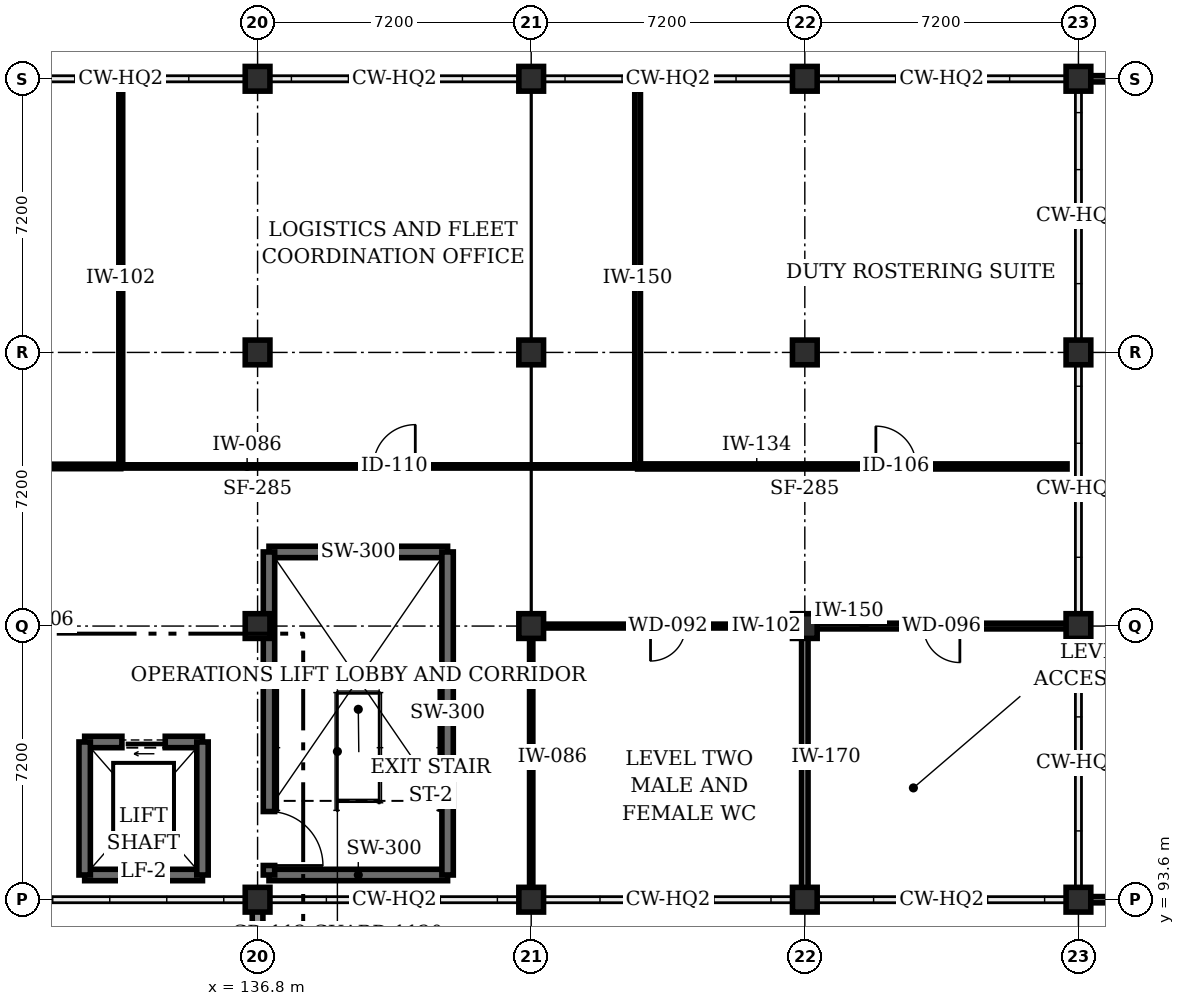
"""IFC4 building model, lengths in metres.
Left out: names, types, materials, properties, quantities, classifications, styles, units other than length and angle.
Written with IfcOpenShell. Run it as: python <this file> out.ifc"""

import sys

from ifc_helpers import new_model, si_unit, direction, frame, frame_2d, origin, origin_2d, place, context, subcontext, project, spatial, rectangle, extrude, element, fill, save


model = new_model("IFC4")
c1 = context("Model", 3, precision=1e-05, world=origin(), true_north=direction((0.0, 1.0)))
c2 = subcontext(c1, "Body", "Model", "MODEL_VIEW")
j1 = project(units=[si_unit("LENGTHUNIT", "METRE"), si_unit("PLANEANGLEUNIT", "RADIAN")], contexts=[c1])
p1 = place(None, origin())
s1 = spatial("IfcSite", under=j1, at=p1, CompositionType="ELEMENT")
p2 = place(p1, origin())
s2 = spatial("IfcBuilding", under=s1, at=p2, CompositionType="ELEMENT")
p3 = place(p2, frame((0.0, 0.0, 6.0)))
s3 = spatial("IfcBuildingStorey", under=s2, at=p3, CompositionType="ELEMENT", Elevation=6.0)
for number, where, z_axis, x_axis in (
    (1, (136.8, 93.6, 0.0), (0.0, 0.0, 1.0), (1.0, 0.0, 0.0)),
    (2, (136.8, 100.8, 0.0), (0.0, 0.0, 1.0), (1.0, 0.0, 0.0)),
    (3, (136.8, 108.0, 0.0), (0.0, 0.0, 1.0), (1.0, 0.0, 0.0)),
    (4, (136.8, 115.2, 0.0), (0.0, 0.0, 1.0), (1.0, 0.0, 0.0)),
    (5, (144.0, 93.6, 0.0), (0.0, 0.0, 1.0), (1.0, 0.0, 0.0)),
    (6, (144.0, 100.8, 0.0), (0.0, 0.0, 1.0), (1.0, 0.0, 0.0)),
    (7, (144.0, 108.0, 0.0), (0.0, 0.0, 1.0), (1.0, 0.0, 0.0)),
    (8, (144.0, 115.2, 0.0), (0.0, 0.0, 1.0), (1.0, 0.0, 0.0)),
    (9, (151.2, 93.6, 0.0), (0.0, 0.0, 1.0), (1.0, 0.0, 0.0)),
    (10, (151.2, 100.8, 0.0), (0.0, 0.0, 1.0), (1.0, 0.0, 0.0)),
    (11, (151.2, 108.0, 0.0), (0.0, 0.0, 1.0), (1.0, 0.0, 0.0)),
    (12, (151.2, 115.2, 0.0), (0.0, 0.0, 1.0), (1.0, 0.0, 0.0)),
    (13, (158.4, 93.6, 0.0), (0.0, 0.0, 1.0), (1.0, 0.0, 0.0)),
    (14, (158.4, 100.8, 0.0), (0.0, 0.0, 1.0), (1.0, 0.0, 0.0)),
    (15, (158.4, 108.0, 0.0), (0.0, 0.0, 1.0), (1.0, 0.0, 0.0)),
    (16, (158.4, 115.2, 0.0), (0.0, 0.0, 1.0), (1.0, 0.0, 0.0)),
):
    element("IfcColumn", number, at=place(p3, frame(where, z_axis=z_axis, x_axis=x_axis)), inside=s3, PredefinedType="COLUMN", context=c2, shape_type="SweptSolid", body=[
        extrude(rectangle(XDim=0.65, YDim=0.65, at=origin_2d()), origin(), (0.0, 0.0, 1.0), 4.2),
    ])
p4 = place(p3, frame((136.8, 93.6, 0.0), z_axis=(0.0, 0.0, 1.0), x_axis=(0.0, -1.0, 0.0)))
e17 = element("IfcWall", 17, at=p4, inside=s3, PredefinedType="STANDARD", context=c2, shape_type="SweptSolid", body=[
    extrude(rectangle(XDim=50.4, YDim=0.28, at=frame_2d((25.2, 0.0))), origin(), (0.0, 0.0, 1.0), 3.247),
])
for number, where, z_axis, x_axis in (
    (18, (158.4, 93.6, 0.0), (0.0, 0.0, 1.0), (1.0, 0.0, 0.0)),
    (19, (165.6, 115.2, 0.0), (0.0, 0.0, 1.0), (-1.0, 0.0, 0.0)),
):
    element("IfcWall", number, at=place(p3, frame(where, z_axis=z_axis, x_axis=x_axis)), inside=s3, PredefinedType="PARAPET", context=c2, shape_type="SweptSolid", body=[
        extrude(rectangle(XDim=7.2, YDim=0.165, at=frame_2d((3.6, 0.0))), origin(), (0.0, 0.0, 1.0), 1.15),
    ])
for number, where, z_axis, x_axis in (
    (20, (137.1, 94.25, 0.0), (0.0, 0.0, 1.0), (1.0, 0.0, 0.0)),
    (21, (141.8, 102.75, 0.0), (0.0, 0.0, 1.0), (-1.0, 0.0, 0.0)),
):
    element("IfcWall", number, at=place(p3, frame(where, z_axis=z_axis, x_axis=x_axis)), inside=s3, PredefinedType="SHEAR", context=c2, shape_type="SweptSolid", body=[
        extrude(rectangle(XDim=4.7, YDim=0.3, at=frame_2d((2.35, 0.0))), origin(), (0.0, 0.0, 1.0), 3.94),
    ])
p5 = place(p3, frame((137.1, 102.75, 0.0), z_axis=(0.0, 0.0, 1.0), x_axis=(0.0, -1.0, 0.0)))
e22 = element("IfcWall", 22, at=p5, inside=s3, PredefinedType="SHEAR", context=c2, shape_type="SweptSolid", body=[
    extrude(rectangle(XDim=8.5, YDim=0.3, at=frame_2d((4.25, 0.0))), origin(), (0.0, 0.0, 1.0), 3.94),
])
p6 = place(p5, frame((6.83, 0.0, 0.0)))
e23 = element("IfcOpeningElement", 23, at=p6, cuts=e22, PredefinedType="OPENING", context=c2, shape_type="SweptSolid", body=[
    extrude(rectangle(XDim=1.42, YDim=2.22, at=frame_2d((0.71, 1.11))), frame((0.0, 0.16, 0.0), z_axis=(0.0, -1.0, 0.0), x_axis=(1.0, 0.0, 0.0)), (0.0, 0.0, 1.0), 0.32),
])
p7 = place(p3, frame((141.8, 94.25, 0.0), z_axis=(0.0, 0.0, 1.0), x_axis=(0.0, 1.0, 0.0)))
e24 = element("IfcWall", 24, at=p7, inside=s3, PredefinedType="SHEAR", context=c2, shape_type="SweptSolid", body=[
    extrude(rectangle(XDim=8.5, YDim=0.3, at=frame_2d((4.25, 0.0))), origin(), (0.0, 0.0, 1.0), 3.94),
])
p8 = place(p3, frame((132.25, 94.25, 0.0), z_axis=(0.0, 0.0, 1.0), x_axis=(1.0, 0.0, 0.0)))
e25 = element("IfcWall", 25, at=p8, inside=s3, PredefinedType="SHEAR", context=c2, shape_type="SweptSolid", body=[
    extrude(rectangle(XDim=3.1, YDim=0.3, at=frame_2d((1.55, 0.0))), origin(), (0.0, 0.0, 1.0), 3.94),
])
p9 = place(p3, frame((135.35, 97.75, 0.0), z_axis=(0.0, 0.0, 1.0), x_axis=(-1.0, 0.0, 0.0)))
e26 = element("IfcWall", 26, at=p9, inside=s3, PredefinedType="SHEAR", context=c2, shape_type="SweptSolid", body=[
    extrude(rectangle(XDim=3.1, YDim=0.3, at=frame_2d((1.55, 0.0))), origin(), (0.0, 0.0, 1.0), 3.94),
])
p10 = place(p9, frame((0.98, 0.0, 0.0)))
e27 = element("IfcOpeningElement", 27, at=p10, cuts=e26, PredefinedType="OPENING", context=c2, shape_type="SweptSolid", body=[
    extrude(rectangle(XDim=1.14, YDim=2.24, at=frame_2d((0.57, 1.12))), frame((0.0, 0.16, 0.0), z_axis=(0.0, -1.0, 0.0), x_axis=(1.0, 0.0, 0.0)), (0.0, 0.0, 1.0), 0.32),
])
for number, where, z_axis, x_axis in (
    (28, (132.25, 97.75, 0.0), (0.0, 0.0, 1.0), (0.0, -1.0, 0.0)),
    (29, (135.35, 94.25, 0.0), (0.0, 0.0, 1.0), (0.0, 1.0, 0.0)),
):
    element("IfcWall", number, at=place(p3, frame(where, z_axis=z_axis, x_axis=x_axis)), inside=s3, PredefinedType="SHEAR", context=c2, shape_type="SweptSolid", body=[
        extrude(rectangle(XDim=3.5, YDim=0.3, at=frame_2d((1.75, 0.0))), origin(), (0.0, 0.0, 1.0), 3.94),
    ])
p11 = place(p3, frame((115.5, 105.0, 0.0), z_axis=(0.0, 0.0, 1.0), x_axis=(1.0, 0.0, 0.0)))
e30 = element("IfcWall", 30, at=p11, inside=s3, PredefinedType="STANDARD", context=c2, shape_type="SweptSolid", body=[
    extrude(rectangle(XDim=17.7, YDim=0.118, at=frame_2d((8.85, 0.0))), origin(), (0.0, 0.0, 1.0), 3.328),
])
p12 = place(p11, frame((9.93, 0.0, 0.0)))
e31 = element("IfcOpeningElement", 31, at=p12, cuts=e30, PredefinedType="OPENING", context=c2, shape_type="SweptSolid", body=[
    extrude(rectangle(XDim=1.14, YDim=2.2, at=frame_2d((0.57, 1.1))), frame((0.0, 0.069, 0.0), z_axis=(0.0, -1.0, 0.0), x_axis=(1.0, 0.0, 0.0)), (0.0, 0.0, 1.0), 0.138),
])
p13 = place(p3, frame((133.2, 105.0, 0.0), z_axis=(0.0, 0.0, 1.0), x_axis=(0.0, 1.0, 0.0)))
e32 = element("IfcWall", 32, at=p13, inside=s3, PredefinedType="STANDARD", context=c2, shape_type="SweptSolid", body=[
    extrude(rectangle(XDim=9.9, YDim=0.102, at=frame_2d((4.95, 0.0))), origin(), (0.0, 0.0, 1.0), 3.247),
])
p14 = place(p3, frame((133.2, 105.0, 0.0), z_axis=(0.0, 0.0, 1.0), x_axis=(1.0, 0.0, 0.0)))
e33 = element("IfcWall", 33, at=p14, inside=s3, PredefinedType="STANDARD", context=c2, shape_type="SweptSolid", body=[
    extrude(rectangle(XDim=13.6, YDim=0.086, at=frame_2d((6.8, 0.0))), origin(), (0.0, 0.0, 1.0), 3.328),
])
p15 = place(p14, frame((6.65, 0.0, 0.0)))
e34 = element("IfcOpeningElement", 34, at=p15, cuts=e33, PredefinedType="OPENING", context=c2, shape_type="SweptSolid", body=[
    extrude(rectangle(XDim=1.1, YDim=2.2, at=frame_2d((0.55, 1.1))), frame((0.0, 0.053, 0.0), z_axis=(0.0, -1.0, 0.0), x_axis=(1.0, 0.0, 0.0)), (0.0, 0.0, 1.0), 0.106),
])
p16 = place(p3, frame((146.8, 105.0, 0.0), z_axis=(0.0, 0.0, 1.0), x_axis=(0.0, 1.0, 0.0)))
e35 = element("IfcWall", 35, at=p16, inside=s3, PredefinedType="STANDARD", context=c2, shape_type="SweptSolid", body=[
    extrude(rectangle(XDim=9.9, YDim=0.15, at=frame_2d((4.95, 0.0))), origin(), (0.0, 0.0, 1.0), 3.247),
])
p17 = place(p3, frame((146.8, 105.0, 0.0), z_axis=(0.0, 0.0, 1.0), x_axis=(1.0, 0.0, 0.0)))
e36 = element("IfcWall", 36, at=p17, inside=s3, PredefinedType="STANDARD", context=c2, shape_type="SweptSolid", body=[
    extrude(rectangle(XDim=11.3, YDim=0.134, at=frame_2d((5.65, 0.0))), origin(), (0.0, 0.0, 1.0), 3.328),
])
p18 = place(p17, frame((6.27, 0.0, 0.0)))
e37 = element("IfcOpeningElement", 37, at=p18, cuts=e36, PredefinedType="OPENING", context=c2, shape_type="SweptSolid", body=[
    extrude(rectangle(XDim=1.06, YDim=2.18, at=frame_2d((0.53, 1.09))), frame((0.0, 0.077, 0.0), z_axis=(0.0, -1.0, 0.0), x_axis=(1.0, 0.0, 0.0)), (0.0, 0.0, 1.0), 0.154),
])
p19 = place(p3, frame((151.2, 100.8, 0.0), z_axis=(0.0, 0.0, 1.0), x_axis=(-1.0, 0.0, 0.0)))
e38 = element("IfcWall", 38, at=p19, inside=s3, PredefinedType="STANDARD", context=c2, shape_type="SweptSolid", body=[
    extrude(rectangle(XDim=7.2, YDim=0.102, at=frame_2d((3.6, 0.0))), origin(), (0.0, 0.0, 1.0), 3.247),
])
p20 = place(p19, frame((3.14, 0.0, 0.0)))
e39 = element("IfcOpeningElement", 39, at=p20, cuts=e38, PredefinedType="OPENING", context=c2, shape_type="SweptSolid", body=[
    extrude(rectangle(XDim=0.92, YDim=2.1, at=frame_2d((0.46, 1.05))), frame((0.0, 0.061, 0.0), z_axis=(0.0, -1.0, 0.0), x_axis=(1.0, 0.0, 0.0)), (0.0, 0.0, 1.0), 0.122),
])
p21 = place(p3, frame((144.0, 100.8, 0.0), z_axis=(0.0, 0.0, 1.0), x_axis=(0.0, -1.0, 0.0)))
e40 = element("IfcWall", 40, at=p21, inside=s3, PredefinedType="STANDARD", context=c2, shape_type="SweptSolid", body=[
    extrude(rectangle(XDim=6.9, YDim=0.086, at=frame_2d((3.45, 0.0))), origin(), (0.0, 0.0, 1.0), 3.247),
])
p22 = place(p3, frame((151.2, 93.9, 0.0), z_axis=(0.0, 0.0, 1.0), x_axis=(0.0, 1.0, 0.0)))
e41 = element("IfcWall", 41, at=p22, inside=s3, PredefinedType="STANDARD", context=c2, shape_type="SweptSolid", body=[
    extrude(rectangle(XDim=6.9, YDim=0.17, at=frame_2d((3.45, 0.0))), origin(), (0.0, 0.0, 1.0), 3.247),
])
p23 = place(p3, frame((158.1, 100.8, 0.0), z_axis=(0.0, 0.0, 1.0), x_axis=(-1.0, 0.0, 0.0)))
e42 = element("IfcWall", 42, at=p23, inside=s3, PredefinedType="STANDARD", context=c2, shape_type="SweptSolid", body=[
    extrude(rectangle(XDim=6.9, YDim=0.15, at=frame_2d((3.45, 0.0))), origin(), (0.0, 0.0, 1.0), 3.247),
])
p24 = place(p23, frame((2.82, 0.0, 0.0)))
e43 = element("IfcOpeningElement", 43, at=p24, cuts=e42, PredefinedType="OPENING", context=c2, shape_type="SweptSolid", body=[
    extrude(rectangle(XDim=0.96, YDim=2.1, at=frame_2d((0.48, 1.05))), frame((0.0, 0.085, 0.0), z_axis=(0.0, -1.0, 0.0), x_axis=(1.0, 0.0, 0.0)), (0.0, 0.0, 1.0), 0.17),
])
p25 = place(p6, origin())
e44 = element("IfcDoor", 44, at=p25, inside=s3, OperationType="SINGLE_SWING_RIGHT", PredefinedType="DOOR", context=c2, shape_type="SweptSolid", body=[
    extrude(rectangle(XDim=1.42, YDim=2.22, at=frame_2d((0.71, 1.11))), frame((0.0, 0.025, 0.0), z_axis=(0.0, -1.0, 0.0), x_axis=(1.0, 0.0, 0.0)), (0.0, 0.0, 1.0), 0.05),
])
fill(e23, e44)
p26 = place(p10, origin())
e45 = element("IfcDoor", 45, at=p26, inside=s3, OperationType="SLIDING_TO_LEFT", PredefinedType="DOOR", context=c2, shape_type="SweptSolid", body=[
    extrude(rectangle(XDim=1.14, YDim=2.24, at=frame_2d((0.57, 1.12))), frame((0.0, 0.025, 0.0), z_axis=(0.0, -1.0, 0.0), x_axis=(1.0, 0.0, 0.0)), (0.0, 0.0, 1.0), 0.05),
])
fill(e27, e45)
p27 = place(p15, origin())
e46 = element("IfcDoor", 46, at=p27, inside=s3, OperationType="SINGLE_SWING_RIGHT", PredefinedType="DOOR", context=c2, shape_type="SweptSolid", body=[
    extrude(rectangle(XDim=1.1, YDim=2.2, at=frame_2d((0.55, 1.1))), frame((0.0, 0.025, 0.0), z_axis=(0.0, -1.0, 0.0), x_axis=(1.0, 0.0, 0.0)), (0.0, 0.0, 1.0), 0.05),
])
fill(e34, e46)
p28 = place(p18, origin())
e47 = element("IfcDoor", 47, at=p28, inside=s3, OperationType="SINGLE_SWING_LEFT", PredefinedType="DOOR", context=c2, shape_type="SweptSolid", body=[
    extrude(rectangle(XDim=1.06, YDim=2.18, at=frame_2d((0.53, 1.09))), frame((0.0, 0.025, 0.0), z_axis=(0.0, -1.0, 0.0), x_axis=(1.0, 0.0, 0.0)), (0.0, 0.0, 1.0), 0.05),
])
fill(e37, e47)
p29 = place(p20, origin())
e48 = element("IfcDoor", 48, at=p29, inside=s3, OperationType="SINGLE_SWING_RIGHT", PredefinedType="DOOR", context=c2, shape_type="SweptSolid", body=[
    extrude(rectangle(XDim=0.92, YDim=2.1, at=frame_2d((0.46, 1.05))), frame((0.0, 0.025, 0.0), z_axis=(0.0, -1.0, 0.0), x_axis=(1.0, 0.0, 0.0)), (0.0, 0.0, 1.0), 0.05),
])
fill(e39, e48)
p30 = place(p24, origin())
e49 = element("IfcDoor", 49, at=p30, inside=s3, OperationType="SINGLE_SWING_LEFT", PredefinedType="DOOR", context=c2, shape_type="SweptSolid", body=[
    extrude(rectangle(XDim=0.96, YDim=2.1, at=frame_2d((0.48, 1.05))), frame((0.0, 0.025, 0.0), z_axis=(0.0, -1.0, 0.0), x_axis=(1.0, 0.0, 0.0)), (0.0, 0.0, 1.0), 0.05),
])
fill(e43, e49)
save(model, sys.argv[1])
